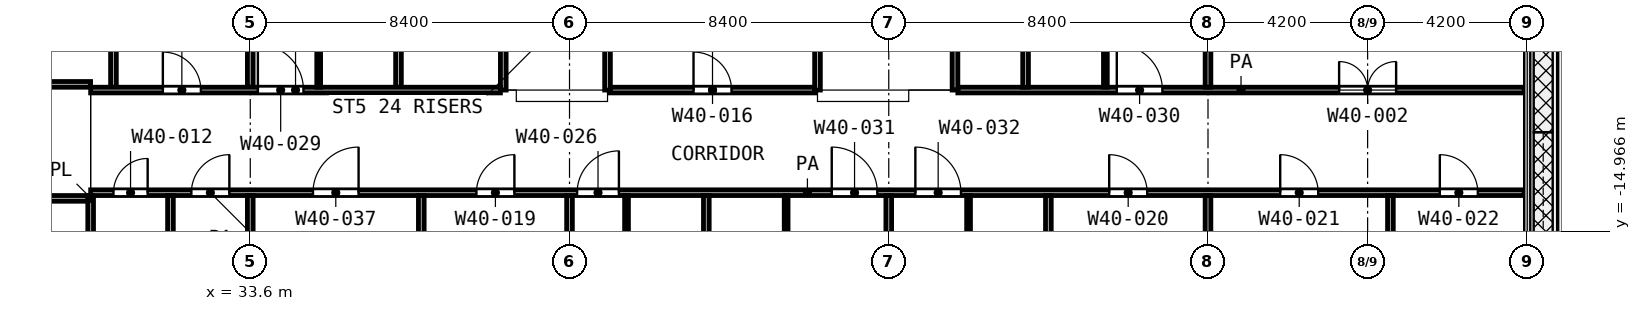
"""IFC4 building model, lengths in metres.
Left out: names, types, materials, properties, quantities, classifications, styles, units other than length and angle.
Written with IfcOpenShell. Run it as: python <this file> out.ifc"""

import sys

from ifc_helpers import new_model, si_unit, direction, frame, frame_2d, origin, place, context, subcontext, project, spatial, rectangle, extrude, element, fill, save


model = new_model("IFC4")
c1 = context("Model", 3, precision=1e-05, world=origin(), true_north=direction((0.0, 1.0)))
c2 = subcontext(c1, "Body", "Model", "MODEL_VIEW")
j1 = project(units=[si_unit("LENGTHUNIT", "METRE"), si_unit("PLANEANGLEUNIT", "RADIAN")], contexts=[c1])
p1 = place(None, origin())
s1 = spatial("IfcSite", under=j1, at=p1, CompositionType="ELEMENT")
p2 = place(p1, origin())
s2 = spatial("IfcBuilding", under=s1, at=p2, CompositionType="ELEMENT")
p3 = place(p2, frame((0.0, 0.0, 196.2)))
s3 = spatial("IfcBuildingStorey", under=s2, at=p3, CompositionType="ELEMENT", Elevation=196.2)
p4 = place(p3, frame((29.4, -14.147, 0.0), z_axis=(0.0, 0.0, 1.0), x_axis=(0.0, 1.0, 0.0)))
e1 = element("IfcWall", 1, at=p4, inside=s3, PredefinedType="PARTITIONING", context=c2, shape_type="SweptSolid", body=[
    extrude(rectangle(XDim=0.12, YDim=0.1, at=frame_2d((0.06, 0.0))), origin(), (0.0, 0.0, 1.0), 3.6),
])
for number, where, z_axis, x_axis in (
    (2, (35.4, -11.175, 0.0), (0.0, 0.0, 1.0), (0.0, 1.0, 0.0)),
    (3, (43.5, -16.65, 0.0), (0.0, 0.0, 1.0), (0.0, 1.0, 0.0)),
    (4, (47.7, -16.65, 0.0), (0.0, 0.0, 1.0), (0.0, 1.0, 0.0)),
    (5, (52.5, -16.65, 0.0), (0.0, 0.0, 1.0), (0.0, 1.0, 0.0)),
    (6, (56.1, -11.175, 0.0), (0.0, 0.0, 1.0), (0.0, 1.0, 0.0)),
):
    element("IfcWall", number, at=place(p3, frame(where, z_axis=z_axis, x_axis=x_axis)), inside=s3, PredefinedType="PARTITIONING", context=c2, shape_type="SweptSolid", body=[
        extrude(rectangle(XDim=2.625, YDim=0.1, at=frame_2d((1.312, 0.0))), origin(), (0.0, 0.0, 1.0), 3.6),
    ])
p5 = place(p3, frame((24.9, -14.1, 0.0), z_axis=(0.0, 0.0, 1.0), x_axis=(1.0, 0.0, 0.0)))
e7 = element("IfcWall", 7, at=p5, inside=s3, PredefinedType="PARTITIONING", context=c2, shape_type="SweptSolid", body=[
    extrude(rectangle(XDim=4.425, YDim=0.15, at=frame_2d((2.212, 0.0))), origin(), (0.0, 0.0, 1.0), 3.6),
])
p6 = place(p5, frame((1.65, 0.0, 0.0)))
e8 = element("IfcOpeningElement", 8, at=p6, cuts=e7, PredefinedType="OPENING", context=c2, shape_type="SweptSolid", body=[
    extrude(rectangle(XDim=1.5, YDim=2.1, at=frame_2d((0.75, 1.05))), frame((0.0, 0.085, 0.0), z_axis=(0.0, -1.0, 0.0), x_axis=(1.0, 0.0, 0.0)), (0.0, 0.0, 1.0), 0.17),
])
p7 = place(p3, frame((29.4, -13.95, 0.0), z_axis=(0.0, 0.0, 1.0), x_axis=(1.0, 0.0, 0.0)))
e9 = element("IfcWall", 9, at=p7, inside=s3, PredefinedType="PARTITIONING", context=c2, shape_type="SweptSolid", body=[
    extrude(rectangle(XDim=37.72, YDim=0.15, at=frame_2d((18.86, 0.0))), origin(), (0.0, 0.0, 1.0), 3.6),
])
p8 = place(p7, frame((10.15, 0.0, 0.0)))
e10 = element("IfcOpeningElement", 10, at=p8, cuts=e9, PredefinedType="OPENING", context=c2, shape_type="SweptSolid", body=[
    extrude(rectangle(XDim=1.0, YDim=2.1, at=frame_2d((0.5, 1.05))), frame((0.0, 0.085, 0.0), z_axis=(0.0, -1.0, 0.0), x_axis=(1.0, 0.0, 0.0)), (0.0, 0.0, 1.0), 0.17),
])
p9 = place(p7, frame((12.8, 0.0, 0.0)))
e11 = element("IfcOpeningElement", 11, at=p9, cuts=e9, PredefinedType="OPENING", context=c2, shape_type="SweptSolid", body=[
    extrude(rectangle(XDim=1.1, YDim=2.1, at=frame_2d((0.55, 1.05))), frame((0.0, 0.085, 0.0), z_axis=(0.0, -1.0, 0.0), x_axis=(1.0, 0.0, 0.0)), (0.0, 0.0, 1.0), 0.17),
])
p10 = place(p7, frame((19.5, 0.0, 0.0)))
e12 = element("IfcOpeningElement", 12, at=p10, cuts=e9, PredefinedType="OPENING", context=c2, shape_type="SweptSolid", body=[
    extrude(rectangle(XDim=1.2, YDim=2.1, at=frame_2d((0.6, 1.05))), frame((0.0, 0.085, 0.0), z_axis=(0.0, -1.0, 0.0), x_axis=(1.0, 0.0, 0.0)), (0.0, 0.0, 1.0), 0.17),
])
p11 = place(p7, frame((21.7, 0.0, 0.0)))
e13 = element("IfcOpeningElement", 13, at=p11, cuts=e9, PredefinedType="OPENING", context=c2, shape_type="SweptSolid", body=[
    extrude(rectangle(XDim=1.2, YDim=2.1, at=frame_2d((0.6, 1.05))), frame((0.0, 0.085, 0.0), z_axis=(0.0, -1.0, 0.0), x_axis=(1.0, 0.0, 0.0)), (0.0, 0.0, 1.0), 0.17),
])
p12 = place(p7, frame((26.8, 0.0, 0.0)))
e14 = element("IfcOpeningElement", 14, at=p12, cuts=e9, PredefinedType="OPENING", context=c2, shape_type="SweptSolid", body=[
    extrude(rectangle(XDim=1.0, YDim=2.1, at=frame_2d((0.5, 1.05))), frame((0.0, 0.085, 0.0), z_axis=(0.0, -1.0, 0.0), x_axis=(1.0, 0.0, 0.0)), (0.0, 0.0, 1.0), 0.17),
])
p13 = place(p7, frame((31.3, 0.0, 0.0)))
e15 = element("IfcOpeningElement", 15, at=p13, cuts=e9, PredefinedType="OPENING", context=c2, shape_type="SweptSolid", body=[
    extrude(rectangle(XDim=1.0, YDim=2.1, at=frame_2d((0.5, 1.05))), frame((0.0, 0.085, 0.0), z_axis=(0.0, -1.0, 0.0), x_axis=(1.0, 0.0, 0.0)), (0.0, 0.0, 1.0), 0.17),
])
p14 = place(p7, frame((35.5, 0.0, 0.0)))
e16 = element("IfcOpeningElement", 16, at=p14, cuts=e9, PredefinedType="OPENING", context=c2, shape_type="SweptSolid", body=[
    extrude(rectangle(XDim=1.0, YDim=2.1, at=frame_2d((0.5, 1.05))), frame((0.0, 0.085, 0.0), z_axis=(0.0, -1.0, 0.0), x_axis=(1.0, 0.0, 0.0)), (0.0, 0.0, 1.0), 0.17),
])
p15 = place(p7, frame((0.6, 0.0, 0.0)))
e17 = element("IfcOpeningElement", 17, at=p15, cuts=e9, PredefinedType="OPENING", context=c2, shape_type="SweptSolid", body=[
    extrude(rectangle(XDim=0.9, YDim=2.1, at=frame_2d((0.45, 1.05))), frame((0.0, 0.085, 0.0), z_axis=(0.0, -1.0, 0.0), x_axis=(1.0, 0.0, 0.0)), (0.0, 0.0, 1.0), 0.17),
])
p16 = place(p7, frame((2.65, 0.0, 0.0)))
e18 = element("IfcOpeningElement", 18, at=p16, cuts=e9, PredefinedType="OPENING", context=c2, shape_type="SweptSolid", body=[
    extrude(rectangle(XDim=1.0, YDim=2.1, at=frame_2d((0.5, 1.05))), frame((0.0, 0.085, 0.0), z_axis=(0.0, -1.0, 0.0), x_axis=(1.0, 0.0, 0.0)), (0.0, 0.0, 1.0), 0.17),
])
p17 = place(p7, frame((5.85, 0.0, 0.0)))
e19 = element("IfcOpeningElement", 19, at=p17, cuts=e9, PredefinedType="OPENING", context=c2, shape_type="SweptSolid", body=[
    extrude(rectangle(XDim=1.2, YDim=2.1, at=frame_2d((0.6, 1.05))), frame((0.0, 0.085, 0.0), z_axis=(0.0, -1.0, 0.0), x_axis=(1.0, 0.0, 0.0)), (0.0, 0.0, 1.0), 0.17),
])
p18 = place(p3, frame((29.4, -11.25, 0.0), z_axis=(0.0, 0.0, 1.0), x_axis=(1.0, 0.0, 0.0)))
e20 = element("IfcWall", 20, at=p18, inside=s3, PredefinedType="PARTITIONING", context=c2, shape_type="SweptSolid", body=[
    extrude(rectangle(XDim=10.782, YDim=0.15, at=frame_2d((5.391, 0.0))), origin(), (0.0, 0.0, 1.0), 3.6),
])
p19 = place(p18, frame((1.9, 0.0, 0.0)))
e21 = element("IfcOpeningElement", 21, at=p19, cuts=e20, PredefinedType="OPENING", context=c2, shape_type="SweptSolid", body=[
    extrude(rectangle(XDim=1.0, YDim=2.1, at=frame_2d((0.5, 1.05))), frame((0.0, 0.085, 0.0), z_axis=(0.0, -1.0, 0.0), x_axis=(1.0, 0.0, 0.0)), (0.0, 0.0, 1.0), 0.17),
])
p20 = place(p18, frame((4.4, 0.0, 0.0)))
e22 = element("IfcOpeningElement", 22, at=p20, cuts=e20, PredefinedType="OPENING", context=c2, shape_type="SweptSolid", body=[
    extrude(rectangle(XDim=1.2, YDim=2.1, at=frame_2d((0.6, 1.05))), frame((0.0, 0.085, 0.0), z_axis=(0.0, -1.0, 0.0), x_axis=(1.0, 0.0, 0.0)), (0.0, 0.0, 1.0), 0.17),
])
p21 = place(p3, frame((43.075, -11.25, 0.0), z_axis=(0.0, 0.0, 1.0), x_axis=(1.0, 0.0, 0.0)))
e23 = element("IfcWall", 23, at=p21, inside=s3, PredefinedType="PARTITIONING", context=c2, shape_type="SweptSolid", body=[
    extrude(rectangle(XDim=5.375, YDim=0.15, at=frame_2d((2.688, 0.0))), origin(), (0.0, 0.0, 1.0), 3.6),
])
p22 = place(p21, frame((2.188, 0.0, 0.0)))
e24 = element("IfcOpeningElement", 24, at=p22, cuts=e23, PredefinedType="OPENING", context=c2, shape_type="SweptSolid", body=[
    extrude(rectangle(XDim=1.0, YDim=2.1, at=frame_2d((0.5, 1.05))), frame((0.0, 0.085, 0.0), z_axis=(0.0, -1.0, 0.0), x_axis=(1.0, 0.0, 0.0)), (0.0, 0.0, 1.0), 0.17),
])
p23 = place(p3, frame((52.218, -11.25, 0.0), z_axis=(0.0, 0.0, 1.0), x_axis=(1.0, 0.0, 0.0)))
e25 = element("IfcWall", 25, at=p23, inside=s3, PredefinedType="PARTITIONING", context=c2, shape_type="SweptSolid", body=[
    extrude(rectangle(XDim=14.902, YDim=0.15, at=frame_2d((7.451, 0.0))), origin(), (0.0, 0.0, 1.0), 3.6),
])
p24 = place(p23, frame((4.182, 0.0, 0.0)))
e26 = element("IfcOpeningElement", 26, at=p24, cuts=e25, PredefinedType="OPENING", context=c2, shape_type="SweptSolid", body=[
    extrude(rectangle(XDim=1.2, YDim=2.1, at=frame_2d((0.6, 1.05))), frame((0.0, 0.085, 0.0), z_axis=(0.0, -1.0, 0.0), x_axis=(1.0, 0.0, 0.0)), (0.0, 0.0, 1.0), 0.17),
])
p25 = place(p23, frame((10.032, 0.0, 0.0)))
e27 = element("IfcOpeningElement", 27, at=p25, cuts=e25, PredefinedType="OPENING", context=c2, shape_type="SweptSolid", body=[
    extrude(rectangle(XDim=1.5, YDim=2.1, at=frame_2d((0.75, 1.05))), frame((0.0, 0.085, 0.0), z_axis=(0.0, -1.0, 0.0), x_axis=(1.0, 0.0, 0.0)), (0.0, 0.0, 1.0), 0.17),
])
p26 = place(p3, frame((24.9, -11.1, 0.0), z_axis=(0.0, 0.0, 1.0), x_axis=(1.0, 0.0, 0.0)))
e28 = element("IfcWall", 28, at=p26, inside=s3, PredefinedType="PARTITIONING", context=c2, shape_type="SweptSolid", body=[
    extrude(rectangle(XDim=4.498, YDim=0.15, at=frame_2d((2.249, 0.0))), origin(), (0.0, 0.0, 1.0), 3.6),
])
p27 = place(p26, frame((1.799, 0.0, 0.0)))
e29 = element("IfcOpeningElement", 29, at=p27, cuts=e28, PredefinedType="OPENING", context=c2, shape_type="SweptSolid", body=[
    extrude(rectangle(XDim=1.2, YDim=2.1, at=frame_2d((0.6, 1.05))), frame((0.0, 0.085, 0.0), z_axis=(0.0, -1.0, 0.0), x_axis=(1.0, 0.0, 0.0)), (0.0, 0.0, 1.0), 0.17),
])
p28 = place(p3, frame((29.4, -31.198, 0.0), z_axis=(0.0, 0.0, 1.0), x_axis=(0.0, 1.0, 0.0)))
e30 = element("IfcWall", 30, at=p28, inside=s3, PredefinedType="PARTITIONING", context=c2, shape_type="SweptSolid", body=[
    extrude(rectangle(XDim=17.098, YDim=0.15, at=frame_2d((8.549, 0.0))), origin(), (0.0, 0.0, 1.0), 3.6),
])
p29 = place(p3, frame((30.0, -11.175, 0.0), z_axis=(0.0, 0.0, 1.0), x_axis=(0.0, 1.0, 0.0)))
e31 = element("IfcWall", 31, at=p29, inside=s3, PredefinedType="PARTITIONING", context=c2, shape_type="SweptSolid", body=[
    extrude(rectangle(XDim=11.095, YDim=0.15, at=frame_2d((5.547, 0.0))), origin(), (0.0, 0.0, 1.0), 2.7),
])
p30 = place(p3, frame((31.5, -24.698, 0.0), z_axis=(0.0, 0.0, 1.0), x_axis=(0.0, 1.0, 0.0)))
e32 = element("IfcWall", 32, at=p30, inside=s3, PredefinedType="PARTITIONING", context=c2, shape_type="SweptSolid", body=[
    extrude(rectangle(XDim=10.673, YDim=0.15, at=frame_2d((5.336, 0.0))), origin(), (0.0, 0.0, 1.0), 3.6),
])
p31 = place(p3, frame((33.6, -16.3, 0.0), z_axis=(0.0, 0.0, 1.0), x_axis=(0.0, 1.0, 0.0)))
e33 = element("IfcWall", 33, at=p31, inside=s3, PredefinedType="PARTITIONING", context=c2, shape_type="SweptSolid", body=[
    extrude(rectangle(XDim=2.275, YDim=0.15, at=frame_2d((1.138, 0.0))), origin(), (0.0, 0.0, 1.0), 3.6),
])
p32 = place(p3, frame((33.6, -11.175, 0.0), z_axis=(0.0, 0.0, 1.0), x_axis=(0.0, 1.0, 0.0)))
e34 = element("IfcWall", 34, at=p32, inside=s3, PredefinedType="PARTITIONING", context=c2, shape_type="SweptSolid", body=[
    extrude(rectangle(XDim=11.095, YDim=0.15, at=frame_2d((5.547, 0.0))), origin(), (0.0, 0.0, 1.0), 3.6),
])
p33 = place(p3, frame((37.5, -11.175, 0.0), z_axis=(0.0, 0.0, 1.0), x_axis=(0.0, 1.0, 0.0)))
e35 = element("IfcWall", 35, at=p33, inside=s3, PredefinedType="PARTITIONING", context=c2, shape_type="SweptSolid", body=[
    extrude(rectangle(XDim=11.095, YDim=0.15, at=frame_2d((5.547, 0.0))), origin(), (0.0, 0.0, 1.0), 2.7),
])
p34 = place(p3, frame((38.1, -31.12, 0.0), z_axis=(0.0, 0.0, 1.0), x_axis=(0.0, 1.0, 0.0)))
e36 = element("IfcWall", 36, at=p34, inside=s3, PredefinedType="PARTITIONING", context=c2, shape_type="SweptSolid", body=[
    extrude(rectangle(XDim=17.095, YDim=0.15, at=frame_2d((8.548, 0.0))), origin(), (0.0, 0.0, 1.0), 3.6),
])
p35 = place(p3, frame((40.257, -11.25, 0.0), z_axis=(0.0, 0.0, 1.0), x_axis=(0.0, 1.0, 0.0)))
e37 = element("IfcWall", 37, at=p35, inside=s3, PredefinedType="PARTITIONING", context=c2, shape_type="SweptSolid", body=[
    extrude(rectangle(XDim=11.17, YDim=0.15, at=frame_2d((5.585, 0.0))), origin(), (0.0, 0.0, 1.0), 2.7),
])
p36 = place(p35, frame((5.125, 0.0, 0.0)))
e38 = element("IfcOpeningElement", 38, at=p36, cuts=e37, PredefinedType="OPENING", context=c2, shape_type="SweptSolid", body=[
    extrude(rectangle(XDim=1.0, YDim=2.1, at=frame_2d((0.5, 1.05))), frame((0.0, 0.085, 0.0), z_axis=(0.0, -1.0, 0.0), x_axis=(1.0, 0.0, 0.0)), (0.0, 0.0, 1.0), 0.17),
])
p37 = place(p3, frame((42.0, -31.12, 0.0), z_axis=(0.0, 0.0, 1.0), x_axis=(0.0, 1.0, 0.0)))
e39 = element("IfcWall", 39, at=p37, inside=s3, PredefinedType="PARTITIONING", context=c2, shape_type="SweptSolid", body=[
    extrude(rectangle(XDim=17.095, YDim=0.15, at=frame_2d((8.548, 0.0))), origin(), (0.0, 0.0, 1.0), 3.6),
])
p38 = place(p3, frame((43.0, -11.25, 0.0), z_axis=(0.0, 0.0, 1.0), x_axis=(0.0, 1.0, 0.0)))
e40 = element("IfcWall", 40, at=p38, inside=s3, PredefinedType="PARTITIONING", context=c2, shape_type="SweptSolid", body=[
    extrude(rectangle(XDim=2.348, YDim=0.15, at=frame_2d((1.174, 0.0))), origin(), (0.0, 0.0, 1.0), 3.6),
])
p39 = place(p3, frame((45.6, -31.12, 0.0), z_axis=(0.0, 0.0, 1.0), x_axis=(0.0, 1.0, 0.0)))
e41 = element("IfcWall", 41, at=p39, inside=s3, PredefinedType="PARTITIONING", context=c2, shape_type="SweptSolid", body=[
    extrude(rectangle(XDim=17.095, YDim=0.15, at=frame_2d((8.548, 0.0))), origin(), (0.0, 0.0, 1.0), 3.6),
])
p40 = place(p3, frame((48.525, -11.25, 0.0), z_axis=(0.0, 0.0, 1.0), x_axis=(0.0, 1.0, 0.0)))
e42 = element("IfcWall", 42, at=p40, inside=s3, PredefinedType="PARTITIONING", context=c2, shape_type="SweptSolid", body=[
    extrude(rectangle(XDim=2.6, YDim=0.15, at=frame_2d((1.3, 0.0))), origin(), (0.0, 0.0, 1.0), 3.6),
])
p41 = place(p3, frame((50.4, -31.12, 0.0), z_axis=(0.0, 0.0, 1.0), x_axis=(0.0, 1.0, 0.0)))
e43 = element("IfcWall", 43, at=p41, inside=s3, PredefinedType="PARTITIONING", context=c2, shape_type="SweptSolid", body=[
    extrude(rectangle(XDim=17.095, YDim=0.15, at=frame_2d((8.548, 0.0))), origin(), (0.0, 0.0, 1.0), 3.6),
])
p42 = place(p3, frame((52.143, -11.25, 0.0), z_axis=(0.0, 0.0, 1.0), x_axis=(0.0, 1.0, 0.0)))
e44 = element("IfcWall", 44, at=p42, inside=s3, PredefinedType="PARTITIONING", context=c2, shape_type="SweptSolid", body=[
    extrude(rectangle(XDim=11.17, YDim=0.15, at=frame_2d((5.585, 0.0))), origin(), (0.0, 0.0, 1.0), 2.7),
])
p43 = place(p42, frame((4.2, 0.0, 0.0)))
e45 = element("IfcOpeningElement", 45, at=p43, cuts=e44, PredefinedType="OPENING", context=c2, shape_type="SweptSolid", body=[
    extrude(rectangle(XDim=1.0, YDim=2.1, at=frame_2d((0.5, 1.05))), frame((0.0, 0.085, 0.0), z_axis=(0.0, -1.0, 0.0), x_axis=(1.0, 0.0, 0.0)), (0.0, 0.0, 1.0), 0.17),
])
p44 = place(p3, frame((54.0, -11.175, 0.0), z_axis=(0.0, 0.0, 1.0), x_axis=(0.0, 1.0, 0.0)))
e46 = element("IfcWall", 46, at=p44, inside=s3, PredefinedType="PARTITIONING", context=c2, shape_type="SweptSolid", body=[
    extrude(rectangle(XDim=11.095, YDim=0.15, at=frame_2d((5.547, 0.0))), origin(), (0.0, 0.0, 1.0), 2.7),
])
for number, where, z_axis, x_axis in (
    (47, (54.6, -31.12, 0.0), (0.0, 0.0, 1.0), (0.0, 1.0, 0.0)),
    (48, (58.8, -31.12, 0.0), (0.0, 0.0, 1.0), (0.0, 1.0, 0.0)),
):
    element("IfcWall", number, at=place(p3, frame(where, z_axis=z_axis, x_axis=x_axis)), inside=s3, PredefinedType="PARTITIONING", context=c2, shape_type="SweptSolid", body=[
        extrude(rectangle(XDim=17.095, YDim=0.15, at=frame_2d((8.548, 0.0))), origin(), (0.0, 0.0, 1.0), 3.6),
    ])
p45 = place(p3, frame((58.8, -11.175, 0.0), z_axis=(0.0, 0.0, 1.0), x_axis=(0.0, 1.0, 0.0)))
e49 = element("IfcWall", 49, at=p45, inside=s3, PredefinedType="PARTITIONING", context=c2, shape_type="SweptSolid", body=[
    extrude(rectangle(XDim=11.095, YDim=0.15, at=frame_2d((5.547, 0.0))), origin(), (0.0, 0.0, 1.0), 2.7),
])
p46 = place(p3, frame((63.6, -28.687, 0.0), z_axis=(0.0, 0.0, 1.0), x_axis=(0.0, 1.0, 0.0)))
e50 = element("IfcWall", 50, at=p46, inside=s3, PredefinedType="PARTITIONING", context=c2, shape_type="SweptSolid", body=[
    extrude(rectangle(XDim=14.662, YDim=0.15, at=frame_2d((7.331, 0.0))), origin(), (0.0, 0.0, 1.0), 3.6),
])
p47 = place(p19, origin())
e51 = element("IfcDoor", 51, at=p47, inside=s3, OperationType="SINGLE_SWING_LEFT", PredefinedType="DOOR", context=c2, shape_type="SweptSolid", body=[
    extrude(rectangle(XDim=1.0, YDim=2.1, at=frame_2d((0.5, 1.05))), frame((0.0, 0.025, 0.0), z_axis=(0.0, -1.0, 0.0), x_axis=(1.0, 0.0, 0.0)), (0.0, 0.0, 1.0), 0.05),
])
fill(e21, e51)
p48 = place(p20, origin())
e52 = element("IfcDoor", 52, at=p48, inside=s3, OperationType="SINGLE_SWING_LEFT", PredefinedType="DOOR", context=c2, shape_type="SweptSolid", body=[
    extrude(rectangle(XDim=1.2, YDim=2.1, at=frame_2d((0.6, 1.05))), frame((0.0, 0.025, 0.0), z_axis=(0.0, -1.0, 0.0), x_axis=(1.0, 0.0, 0.0)), (0.0, 0.0, 1.0), 0.05),
])
fill(e22, e52)
p49 = place(p22, origin())
e53 = element("IfcDoor", 53, at=p49, inside=s3, OperationType="SINGLE_SWING_LEFT", PredefinedType="DOOR", context=c2, shape_type="SweptSolid", body=[
    extrude(rectangle(XDim=1.0, YDim=2.1, at=frame_2d((0.5, 1.05))), frame((0.0, 0.025, 0.0), z_axis=(0.0, -1.0, 0.0), x_axis=(1.0, 0.0, 0.0)), (0.0, 0.0, 1.0), 0.05),
])
fill(e24, e53)
p50 = place(p24, origin())
e54 = element("IfcDoor", 54, at=p50, inside=s3, OperationType="SINGLE_SWING_LEFT", PredefinedType="DOOR", context=c2, shape_type="SweptSolid", body=[
    extrude(rectangle(XDim=1.2, YDim=2.1, at=frame_2d((0.6, 1.05))), frame((0.0, 0.025, 0.0), z_axis=(0.0, -1.0, 0.0), x_axis=(1.0, 0.0, 0.0)), (0.0, 0.0, 1.0), 0.05),
])
fill(e26, e54)
p51 = place(p25, origin())
e55 = element("IfcDoor", 55, at=p51, inside=s3, OperationType="DOUBLE_DOOR_SINGLE_SWING", PredefinedType="DOOR", context=c2, shape_type="SweptSolid", body=[
    extrude(rectangle(XDim=1.5, YDim=2.1, at=frame_2d((0.75, 1.05))), frame((0.0, 0.025, 0.0), z_axis=(0.0, -1.0, 0.0), x_axis=(1.0, 0.0, 0.0)), (0.0, 0.0, 1.0), 0.05),
])
fill(e27, e55)
p52 = place(p8, origin())
e56 = element("IfcDoor", 56, at=p52, inside=s3, OperationType="SINGLE_SWING_RIGHT", PredefinedType="DOOR", context=c2, shape_type="SweptSolid", body=[
    extrude(rectangle(XDim=1.0, YDim=2.1, at=frame_2d((0.5, 1.05))), frame((0.0, 0.025, 0.0), z_axis=(0.0, -1.0, 0.0), x_axis=(1.0, 0.0, 0.0)), (0.0, 0.0, 1.0), 0.05),
])
fill(e10, e56)
p53 = place(p9, origin())
e57 = element("IfcDoor", 57, at=p53, inside=s3, OperationType="SINGLE_SWING_RIGHT", PredefinedType="DOOR", context=c2, shape_type="SweptSolid", body=[
    extrude(rectangle(XDim=1.1, YDim=2.1, at=frame_2d((0.55, 1.05))), frame((0.0, 0.025, 0.0), z_axis=(0.0, -1.0, 0.0), x_axis=(1.0, 0.0, 0.0)), (0.0, 0.0, 1.0), 0.05),
])
fill(e11, e57)
p54 = place(p10, origin())
e58 = element("IfcDoor", 58, at=p54, inside=s3, OperationType="SINGLE_SWING_LEFT", PredefinedType="DOOR", context=c2, shape_type="SweptSolid", body=[
    extrude(rectangle(XDim=1.2, YDim=2.1, at=frame_2d((0.6, 1.05))), frame((0.0, 0.025, 0.0), z_axis=(0.0, -1.0, 0.0), x_axis=(1.0, 0.0, 0.0)), (0.0, 0.0, 1.0), 0.05),
])
fill(e12, e58)
p55 = place(p11, origin())
e59 = element("IfcDoor", 59, at=p55, inside=s3, OperationType="SINGLE_SWING_LEFT", PredefinedType="DOOR", context=c2, shape_type="SweptSolid", body=[
    extrude(rectangle(XDim=1.2, YDim=2.1, at=frame_2d((0.6, 1.05))), frame((0.0, 0.025, 0.0), z_axis=(0.0, -1.0, 0.0), x_axis=(1.0, 0.0, 0.0)), (0.0, 0.0, 1.0), 0.05),
])
fill(e13, e59)
p56 = place(p12, origin())
e60 = element("IfcDoor", 60, at=p56, inside=s3, OperationType="SINGLE_SWING_LEFT", PredefinedType="DOOR", context=c2, shape_type="SweptSolid", body=[
    extrude(rectangle(XDim=1.0, YDim=2.1, at=frame_2d((0.5, 1.05))), frame((0.0, 0.025, 0.0), z_axis=(0.0, -1.0, 0.0), x_axis=(1.0, 0.0, 0.0)), (0.0, 0.0, 1.0), 0.05),
])
fill(e14, e60)
p57 = place(p13, origin())
e61 = element("IfcDoor", 61, at=p57, inside=s3, OperationType="SINGLE_SWING_LEFT", PredefinedType="DOOR", context=c2, shape_type="SweptSolid", body=[
    extrude(rectangle(XDim=1.0, YDim=2.1, at=frame_2d((0.5, 1.05))), frame((0.0, 0.025, 0.0), z_axis=(0.0, -1.0, 0.0), x_axis=(1.0, 0.0, 0.0)), (0.0, 0.0, 1.0), 0.05),
])
fill(e15, e61)
p58 = place(p14, origin())
e62 = element("IfcDoor", 62, at=p58, inside=s3, OperationType="SINGLE_SWING_LEFT", PredefinedType="DOOR", context=c2, shape_type="SweptSolid", body=[
    extrude(rectangle(XDim=1.0, YDim=2.1, at=frame_2d((0.5, 1.05))), frame((0.0, 0.025, 0.0), z_axis=(0.0, -1.0, 0.0), x_axis=(1.0, 0.0, 0.0)), (0.0, 0.0, 1.0), 0.05),
])
fill(e16, e62)
p59 = place(p15, origin())
e63 = element("IfcDoor", 63, at=p59, inside=s3, OperationType="SINGLE_SWING_RIGHT", PredefinedType="DOOR", context=c2, shape_type="SweptSolid", body=[
    extrude(rectangle(XDim=0.9, YDim=2.1, at=frame_2d((0.45, 1.05))), frame((0.0, 0.025, 0.0), z_axis=(0.0, -1.0, 0.0), x_axis=(1.0, 0.0, 0.0)), (0.0, 0.0, 1.0), 0.05),
])
fill(e17, e63)
p60 = place(p16, origin())
e64 = element("IfcDoor", 64, at=p60, inside=s3, OperationType="SINGLE_SWING_RIGHT", PredefinedType="DOOR", context=c2, shape_type="SweptSolid", body=[
    extrude(rectangle(XDim=1.0, YDim=2.1, at=frame_2d((0.5, 1.05))), frame((0.0, 0.025, 0.0), z_axis=(0.0, -1.0, 0.0), x_axis=(1.0, 0.0, 0.0)), (0.0, 0.0, 1.0), 0.05),
])
fill(e18, e64)
p61 = place(p17, origin())
e65 = element("IfcDoor", 65, at=p61, inside=s3, OperationType="SINGLE_SWING_RIGHT", PredefinedType="DOOR", context=c2, shape_type="SweptSolid", body=[
    extrude(rectangle(XDim=1.2, YDim=2.1, at=frame_2d((0.6, 1.05))), frame((0.0, 0.025, 0.0), z_axis=(0.0, -1.0, 0.0), x_axis=(1.0, 0.0, 0.0)), (0.0, 0.0, 1.0), 0.05),
])
fill(e19, e65)
save(model, sys.argv[1])
